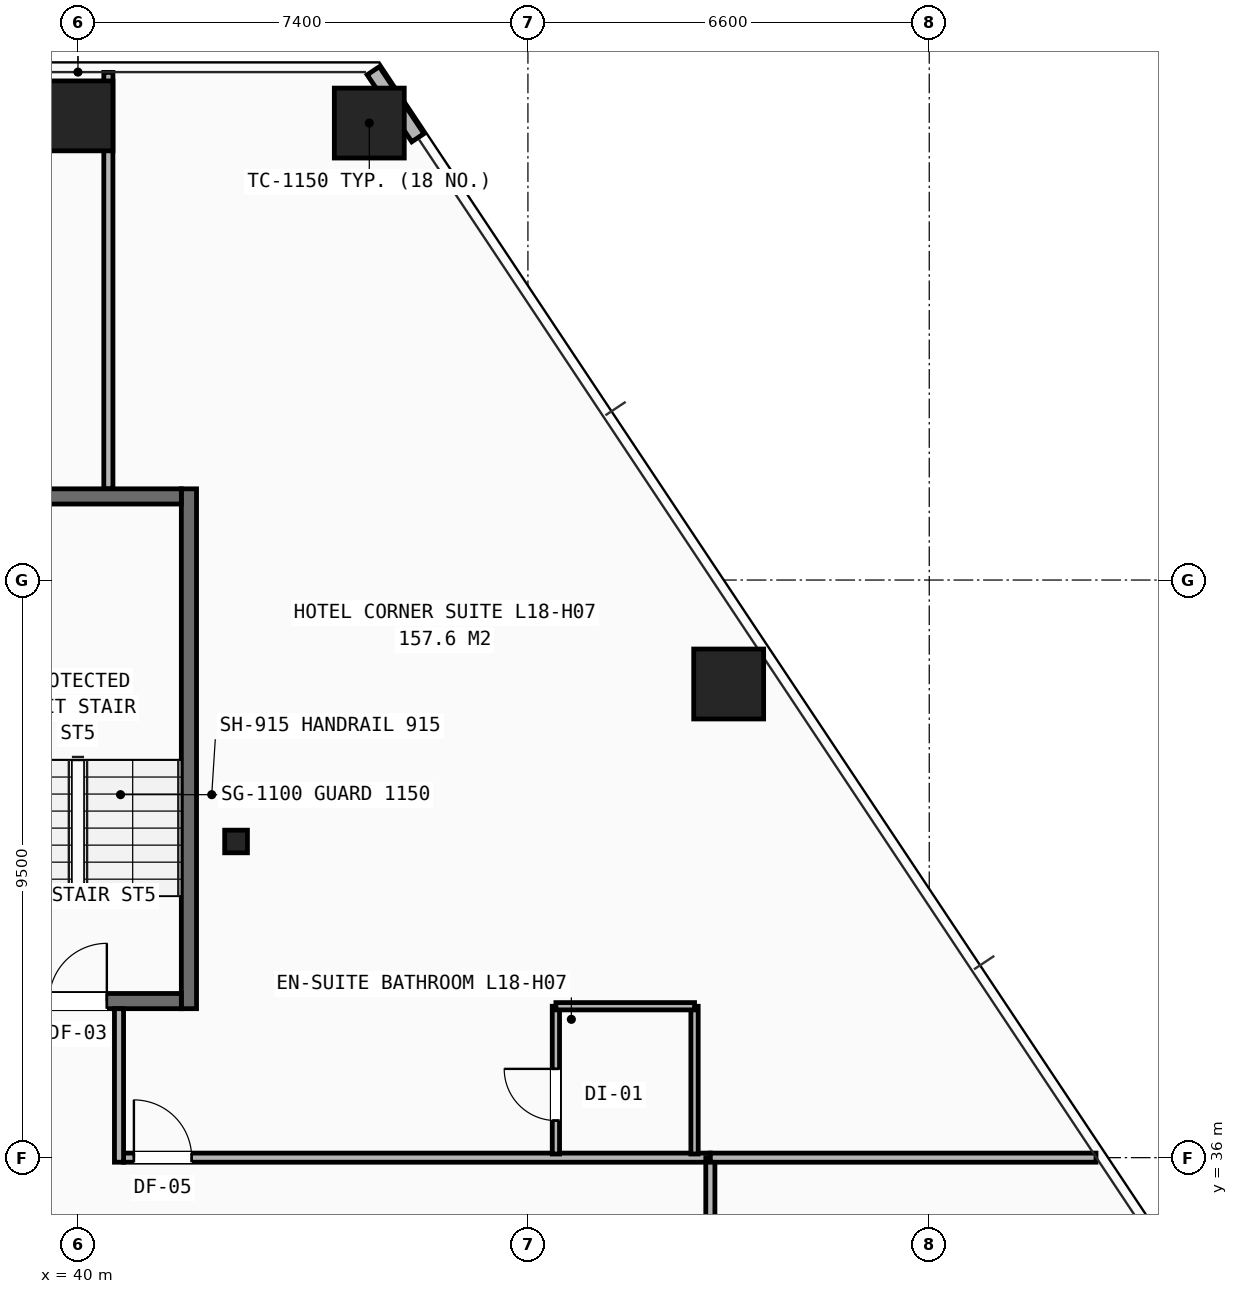
"""IFC4 building model, lengths in metres.
Left out: names, types, materials, properties, quantities, classifications, styles, units other than length and angle.
Written with IfcOpenShell. Run it as: python <this file> out.ifc"""

import sys

from ifc_helpers import new_model, si_unit, direction, frame, frame_2d, origin, origin_2d, place, context, subcontext, project, spatial, rectangle, hollow_rectangle, i_section, extrude, element, fill, save


model = new_model("IFC4")
c1 = context("Model", 3, precision=1e-05, world=origin(), true_north=direction((0.0, 1.0)))
c2 = subcontext(c1, "Body", "Model", "MODEL_VIEW")
j1 = project(units=[si_unit("LENGTHUNIT", "METRE"), si_unit("PLANEANGLEUNIT", "RADIAN")], contexts=[c1])
p1 = place(None, origin())
s1 = spatial("IfcSite", under=j1, at=p1, CompositionType="ELEMENT")
p2 = place(p1, origin())
s2 = spatial("IfcBuilding", under=s1, at=p2, CompositionType="ELEMENT")
p3 = place(p2, frame((0.0, 0.0, 65.6)))
s3 = spatial("IfcBuildingStorey", under=s2, at=p3, CompositionType="ELEMENT", Elevation=65.6)
p4 = place(p3, frame((42.6, 41.2, 0.0), z_axis=(0.0, 0.0, 1.0), x_axis=(1.0, 0.0, 0.0)))
e1 = element("IfcColumn", 1, at=p4, inside=s3, PredefinedType="COLUMN", context=c2, shape_type="SweptSolid", body=[
    extrude(i_section(OverallWidth=0.374, OverallDepth=0.372, WebThickness=0.016, FlangeThickness=0.026, at=origin_2d()), origin(), (0.0, 0.0, 1.0), 3.2),
])
for number, where, z_axis, x_axis in (
    (2, (44.791, 53.016, 0.0), (0.0, 0.0, 1.0), (1.0, 0.0, 0.0)),
    (3, (40.0, 53.134, 0.0), (0.0, 0.0, 1.0), (1.0, 0.0, 0.0)),
    (4, (50.701, 43.79, 0.0), (0.0, 0.0, 1.0), (1.0, 0.0, 0.0)),
):
    element("IfcColumn", number, at=place(p3, frame(where, z_axis=z_axis, x_axis=x_axis)), inside=s3, PredefinedType="COLUMN", context=c2, shape_type="SweptSolid", body=[
        extrude(hollow_rectangle(XDim=1.15, YDim=1.15, WallThickness=0.075, at=origin_2d()), origin(), (0.0, 0.0, 1.0), 3.2),
    ])
p5 = place(p3, frame((45.59, 52.774, 0.0), z_axis=(0.0, 0.0, 1.0), x_axis=(-0.553976279589, 0.832532450811, 0.0)))
e5 = element("IfcWall", 5, at=p5, inside=s3, PredefinedType="SHEAR", context=c2, shape_type="SweptSolid", body=[
    extrude(rectangle(XDim=1.323, YDim=0.24, at=frame_2d((0.662, 0.0))), origin(), (0.0, 0.0, 1.0), 2.183),
])
p6 = place(p3, frame((40.75, 36.0, 0.0), z_axis=(0.0, 0.0, 1.0), x_axis=(1.0, 0.0, 0.0)))
e6 = element("IfcWall", 6, at=p6, inside=s3, PredefinedType="PARTITIONING", context=c2, shape_type="SweptSolid", body=[
    extrude(rectangle(XDim=9.65, YDim=0.15, at=frame_2d((4.825, 0.0))), origin(), (0.0, 0.0, 1.0), 2.433),
])
p7 = place(p6, frame((0.17, 0.0, 0.0)))
e7 = element("IfcOpeningElement", 7, at=p7, cuts=e6, PredefinedType="OPENING", context=c2, shape_type="SweptSolid", body=[
    extrude(rectangle(XDim=0.95, YDim=2.1, at=frame_2d((0.475, 1.05))), frame((0.0, 0.085, 0.0), z_axis=(0.0, -1.0, 0.0), x_axis=(1.0, 0.0, 0.0)), (0.0, 0.0, 1.0), 0.17),
])
p8 = place(p3, frame((50.4, 14.1, 0.0), z_axis=(0.0, 0.0, 1.0), x_axis=(0.0, 1.0, 0.0)))
e8 = element("IfcWall", 8, at=p8, inside=s3, PredefinedType="PARTITIONING", context=c2, shape_type="SweptSolid", body=[
    extrude(rectangle(XDim=21.9, YDim=0.15, at=frame_2d((10.95, 0.0))), origin(), (0.0, 0.0, 1.0), 2.351),
])
p9 = place(p8, frame((0.42, 0.0, 0.0)))
e9 = element("IfcOpeningElement", 9, at=p9, cuts=e8, PredefinedType="OPENING", context=c2, shape_type="SweptSolid", body=[
    extrude(rectangle(XDim=0.95, YDim=2.1, at=frame_2d((0.475, 1.05))), frame((0.0, 0.085, 0.0), z_axis=(0.0, -1.0, 0.0), x_axis=(1.0, 0.0, 0.0)), (0.0, 0.0, 1.0), 0.17),
])
p10 = place(p8, frame((11.32, 0.0, 0.0)))
e10 = element("IfcOpeningElement", 10, at=p10, cuts=e8, PredefinedType="OPENING", context=c2, shape_type="SweptSolid", body=[
    extrude(rectangle(XDim=0.95, YDim=2.1, at=frame_2d((0.475, 1.05))), frame((0.0, 0.085, 0.0), z_axis=(0.0, -1.0, 0.0), x_axis=(1.0, 0.0, 0.0)), (0.0, 0.0, 1.0), 0.17),
])
p11 = place(p3, frame((50.4, 36.0, 0.0), z_axis=(0.0, 0.0, 1.0), x_axis=(1.0, 0.0, 0.0)))
e11 = element("IfcWall", 11, at=p11, inside=s3, PredefinedType="PARTITIONING", context=c2, shape_type="SweptSolid", body=[
    extrude(rectangle(XDim=6.343, YDim=0.15, at=frame_2d((3.171, 0.0))), origin(), (0.0, 0.0, 1.0), 2.188),
])
p12 = place(p3, frame((40.5, 47.0, 0.0), z_axis=(0.0, 0.0, 1.0), x_axis=(0.0, 1.0, 0.0)))
e12 = element("IfcWall", 12, at=p12, inside=s3, PredefinedType="PARTITIONING", context=c2, shape_type="SweptSolid", body=[
    extrude(rectangle(XDim=6.849, YDim=0.15, at=frame_2d((3.425, 0.0))), origin(), (0.0, 0.0, 1.0), 2.188),
])
p13 = place(p3, frame((47.86, 36.06, 0.0), z_axis=(0.0, 0.0, 1.0), x_axis=(0.0, 1.0, 0.0)))
e13 = element("IfcWall", 13, at=p13, inside=s3, PredefinedType="PARTITIONING", context=c2, shape_type="SweptSolid", body=[
    extrude(rectangle(XDim=2.43, YDim=0.12, at=frame_2d((1.215, 0.0))), origin(), (0.0, 0.0, 1.0), 2.9),
])
p14 = place(p13, frame((0.55, 0.0, 0.0)))
e14 = element("IfcOpeningElement", 14, at=p14, cuts=e13, PredefinedType="OPENING", context=c2, shape_type="SweptSolid", body=[
    extrude(rectangle(XDim=0.85, YDim=2.05, at=frame_2d((0.425, 1.025))), frame((0.0, 0.07, 0.0), z_axis=(0.0, -1.0, 0.0), x_axis=(1.0, 0.0, 0.0)), (0.0, 0.0, 1.0), 0.14),
])
p15 = place(p3, frame((50.14, 36.06, 0.0), z_axis=(0.0, 0.0, 1.0), x_axis=(0.0, 1.0, 0.0)))
e15 = element("IfcWall", 15, at=p15, inside=s3, PredefinedType="PARTITIONING", context=c2, shape_type="SweptSolid", body=[
    extrude(rectangle(XDim=2.43, YDim=0.12, at=frame_2d((1.215, 0.0))), origin(), (0.0, 0.0, 1.0), 2.433),
])
p16 = place(p3, frame((47.86, 38.49, 0.0), z_axis=(0.0, 0.0, 1.0), x_axis=(1.0, 0.0, 0.0)))
e16 = element("IfcWall", 16, at=p16, inside=s3, PredefinedType="PARTITIONING", context=c2, shape_type="SweptSolid", body=[
    extrude(rectangle(XDim=2.28, YDim=0.12, at=frame_2d((1.14, 0.0))), origin(), (0.0, 0.0, 1.0), 2.433),
])
p17 = place(p3, frame((41.825, 38.45, 0.0), z_axis=(0.0, 0.0, 1.0), x_axis=(0.0, 1.0, 0.0)))
e17 = element("IfcWall", 17, at=p17, inside=s3, PredefinedType="SHEAR", context=c2, shape_type="SweptSolid", body=[
    extrude(rectangle(XDim=8.55, YDim=0.25, at=frame_2d((4.275, 0.0))), origin(), (0.0, 0.0, 1.0), 2.9),
])
p18 = place(p3, frame((38.3, 38.575, 0.0), z_axis=(0.0, 0.0, 1.0), x_axis=(1.0, 0.0, 0.0)))
e18 = element("IfcWall", 18, at=p18, inside=s3, PredefinedType="SHEAR", context=c2, shape_type="SweptSolid", body=[
    extrude(rectangle(XDim=3.4, YDim=0.25, at=frame_2d((1.7, 0.0))), origin(), (0.0, 0.0, 1.0), 2.9),
])
p19 = place(p18, frame((1.225, 0.0, 0.0)))
e19 = element("IfcOpeningElement", 19, at=p19, cuts=e18, PredefinedType="OPENING", context=c2, shape_type="SweptSolid", body=[
    extrude(rectangle(XDim=0.95, YDim=2.1, at=frame_2d((0.475, 1.05))), frame((0.0, 0.135, 0.0), z_axis=(0.0, -1.0, 0.0), x_axis=(1.0, 0.0, 0.0)), (0.0, 0.0, 1.0), 0.27),
])
p20 = place(p3, frame((38.3, 46.875, 0.0), z_axis=(0.0, 0.0, 1.0), x_axis=(1.0, 0.0, 0.0)))
e20 = element("IfcWall", 20, at=p20, inside=s3, PredefinedType="SHEAR", context=c2, shape_type="SweptSolid", body=[
    extrude(rectangle(XDim=3.4, YDim=0.25, at=frame_2d((1.7, 0.0))), origin(), (0.0, 0.0, 1.0), 2.9),
])
p21 = place(p3, frame((40.675, 35.925, 0.0), z_axis=(0.0, 0.0, 1.0), x_axis=(0.0, 1.0, 0.0)))
e21 = element("IfcWall", 21, at=p21, inside=s3, PredefinedType="PARTITIONING", context=c2, shape_type="SweptSolid", body=[
    extrude(rectangle(XDim=2.525, YDim=0.15, at=frame_2d((1.262, 0.0))), origin(), (0.0, 0.0, 1.0), 2.9),
])
p22 = place(p7, origin())
e22 = element("IfcDoor", 22, at=p22, inside=s3, OperationType="SINGLE_SWING_LEFT", PredefinedType="DOOR", context=c2, shape_type="SweptSolid", body=[
    extrude(rectangle(XDim=0.95, YDim=2.1, at=frame_2d((0.475, 1.05))), frame((0.0, 0.025, 0.0), z_axis=(0.0, -1.0, 0.0), x_axis=(1.0, 0.0, 0.0)), (0.0, 0.0, 1.0), 0.05),
])
fill(e7, e22)
p23 = place(p14, origin())
e23 = element("IfcDoor", 23, at=p23, inside=s3, OperationType="SINGLE_SWING_RIGHT", PredefinedType="DOOR", context=c2, shape_type="SweptSolid", body=[
    extrude(rectangle(XDim=0.85, YDim=2.05, at=frame_2d((0.425, 1.025))), frame((0.0, 0.025, 0.0), z_axis=(0.0, -1.0, 0.0), x_axis=(1.0, 0.0, 0.0)), (0.0, 0.0, 1.0), 0.05),
])
fill(e14, e23)
p24 = place(p19, origin())
e24 = element("IfcDoor", 24, at=p24, inside=s3, OperationType="SINGLE_SWING_RIGHT", PredefinedType="DOOR", context=c2, shape_type="SweptSolid", body=[
    extrude(rectangle(XDim=0.95, YDim=2.1, at=frame_2d((0.475, 1.05))), frame((0.0, 0.025, 0.0), z_axis=(0.0, -1.0, 0.0), x_axis=(1.0, 0.0, 0.0)), (0.0, 0.0, 1.0), 0.05),
])
fill(e19, e24)
save(model, sys.argv[1])
